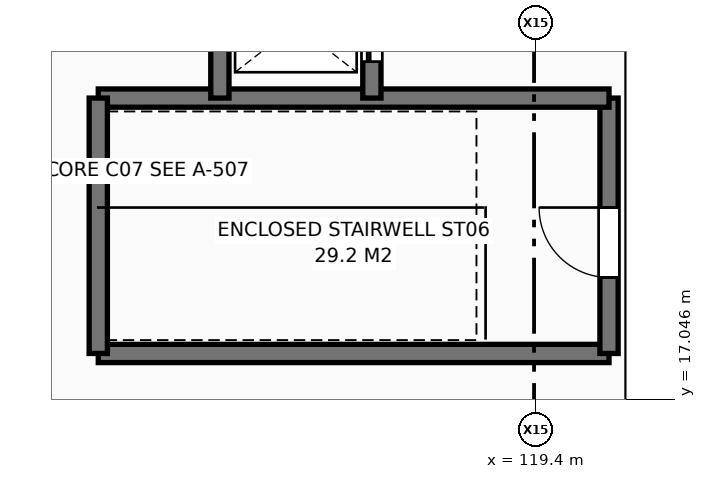
"""IFC4 building model, lengths in metres.
Left out: names, types, materials, properties, quantities, classifications, styles, units other than length and angle.
Written with IfcOpenShell. Run it as: python <this file> out.ifc"""

import sys

from ifc_helpers import new_model, si_unit, direction, frame, frame_2d, origin, place, context, subcontext, project, spatial, rectangle, extrude, element, fill, save


model = new_model("IFC4")
c1 = context("Model", 3, precision=1e-05, world=origin(), true_north=direction((0.0, 1.0)))
c2 = subcontext(c1, "Body", "Model", "MODEL_VIEW")
j1 = project(units=[si_unit("LENGTHUNIT", "METRE"), si_unit("PLANEANGLEUNIT", "RADIAN")], contexts=[c1])
p1 = place(None, origin())
s1 = spatial("IfcSite", under=j1, at=p1, CompositionType="ELEMENT")
p2 = place(p1, origin())
s2 = spatial("IfcBuilding", under=s1, at=p2, CompositionType="ELEMENT")
p3 = place(p2, frame((0.0, 0.0, 9.6)))
s3 = spatial("IfcBuildingStorey", under=s2, at=p3, CompositionType="ELEMENT", Elevation=9.6)
p4 = place(p3, frame((112.2, 17.8, 0.0), z_axis=(0.0, 0.0, 1.0), x_axis=(1.0, 0.0, 0.0)))
e1 = element("IfcWall", 1, at=p4, inside=s3, PredefinedType="SHEAR", context=c2, shape_type="SweptSolid", body=[
    extrude(rectangle(XDim=8.4, YDim=0.3, at=frame_2d((4.2, 0.0))), origin(), (0.0, 0.0, 1.0), 3.92),
])
p5 = place(p3, frame((120.6, 17.8, 0.0), z_axis=(0.0, 0.0, 1.0), x_axis=(0.0, 1.0, 0.0)))
e2 = element("IfcWall", 2, at=p5, inside=s3, PredefinedType="SHEAR", context=c2, shape_type="SweptSolid", body=[
    extrude(rectangle(XDim=4.2, YDim=0.3, at=frame_2d((2.1, 0.0))), origin(), (0.0, 0.0, 1.0), 3.92),
])
p6 = place(p5, frame((1.25, 0.0, 0.0)))
e3 = element("IfcOpeningElement", 3, at=p6, cuts=e2, PredefinedType="OPENING", context=c2, shape_type="SweptSolid", body=[
    extrude(rectangle(XDim=1.15, YDim=2.2, at=frame_2d((0.575, 1.1))), frame((0.0, 0.16, 0.0), z_axis=(0.0, -1.0, 0.0), x_axis=(1.0, 0.0, 0.0)), (0.0, 0.0, 1.0), 0.32),
])
p7 = place(p3, frame((120.6, 22.0, 0.0), z_axis=(0.0, 0.0, 1.0), x_axis=(-1.0, 0.0, 0.0)))
e4 = element("IfcWall", 4, at=p7, inside=s3, PredefinedType="SHEAR", context=c2, shape_type="SweptSolid", body=[
    extrude(rectangle(XDim=8.4, YDim=0.3, at=frame_2d((4.2, 0.0))), origin(), (0.0, 0.0, 1.0), 3.92),
])
p8 = place(p3, frame((112.2, 22.0, 0.0), z_axis=(0.0, 0.0, 1.0), x_axis=(0.0, -1.0, 0.0)))
e5 = element("IfcWall", 5, at=p8, inside=s3, PredefinedType="SHEAR", context=c2, shape_type="SweptSolid", body=[
    extrude(rectangle(XDim=4.2, YDim=0.3, at=frame_2d((2.1, 0.0))), origin(), (0.0, 0.0, 1.0), 3.92),
])
p9 = place(p3, frame((114.2, 24.4, 0.0), z_axis=(0.0, 0.0, 1.0), x_axis=(0.0, -1.0, 0.0)))
e6 = element("IfcWall", 6, at=p9, inside=s3, PredefinedType="SHEAR", context=c2, shape_type="SweptSolid", body=[
    extrude(rectangle(XDim=2.4, YDim=0.3, at=frame_2d((1.2, 0.0))), origin(), (0.0, 0.0, 1.0), 3.92),
])
p10 = place(p3, frame((116.7, 22.0, 0.0), z_axis=(0.0, 0.0, 1.0), x_axis=(0.0, 1.0, 0.0)))
e7 = element("IfcWall", 7, at=p10, inside=s3, PredefinedType="SHEAR", context=c2, shape_type="SweptSolid", body=[
    extrude(rectangle(XDim=2.4, YDim=0.3, at=frame_2d((1.2, 0.0))), origin(), (0.0, 0.0, 1.0), 3.92),
])
p11 = place(p10, frame((0.6, 0.0, 0.0)))
e8 = element("IfcOpeningElement", 8, at=p11, cuts=e7, PredefinedType="OPENING", context=c2, shape_type="SweptSolid", body=[
    extrude(rectangle(XDim=1.2, YDim=2.25, at=frame_2d((0.6, 1.125))), frame((0.0, 0.16, 0.0), z_axis=(0.0, -1.0, 0.0), x_axis=(1.0, 0.0, 0.0)), (0.0, 0.0, 1.0), 0.32),
])
p12 = place(p6, origin())
e9 = element("IfcDoor", 9, at=p12, inside=s3, OperationType="SINGLE_SWING_RIGHT", PredefinedType="DOOR", context=c2, shape_type="SweptSolid", body=[
    extrude(rectangle(XDim=1.15, YDim=2.2, at=frame_2d((0.575, 1.1))), frame((0.0, 0.025, 0.0), z_axis=(0.0, -1.0, 0.0), x_axis=(1.0, 0.0, 0.0)), (0.0, 0.0, 1.0), 0.05),
])
fill(e3, e9)
p13 = place(p11, origin())
e10 = element("IfcDoor", 10, at=p13, inside=s3, OperationType="SLIDING_TO_LEFT", PredefinedType="DOOR", context=c2, shape_type="SweptSolid", body=[
    extrude(rectangle(XDim=1.2, YDim=2.25, at=frame_2d((0.6, 1.125))), frame((0.0, 0.025, 0.0), z_axis=(0.0, -1.0, 0.0), x_axis=(1.0, 0.0, 0.0)), (0.0, 0.0, 1.0), 0.05),
])
fill(e8, e10)
save(model, sys.argv[1])
